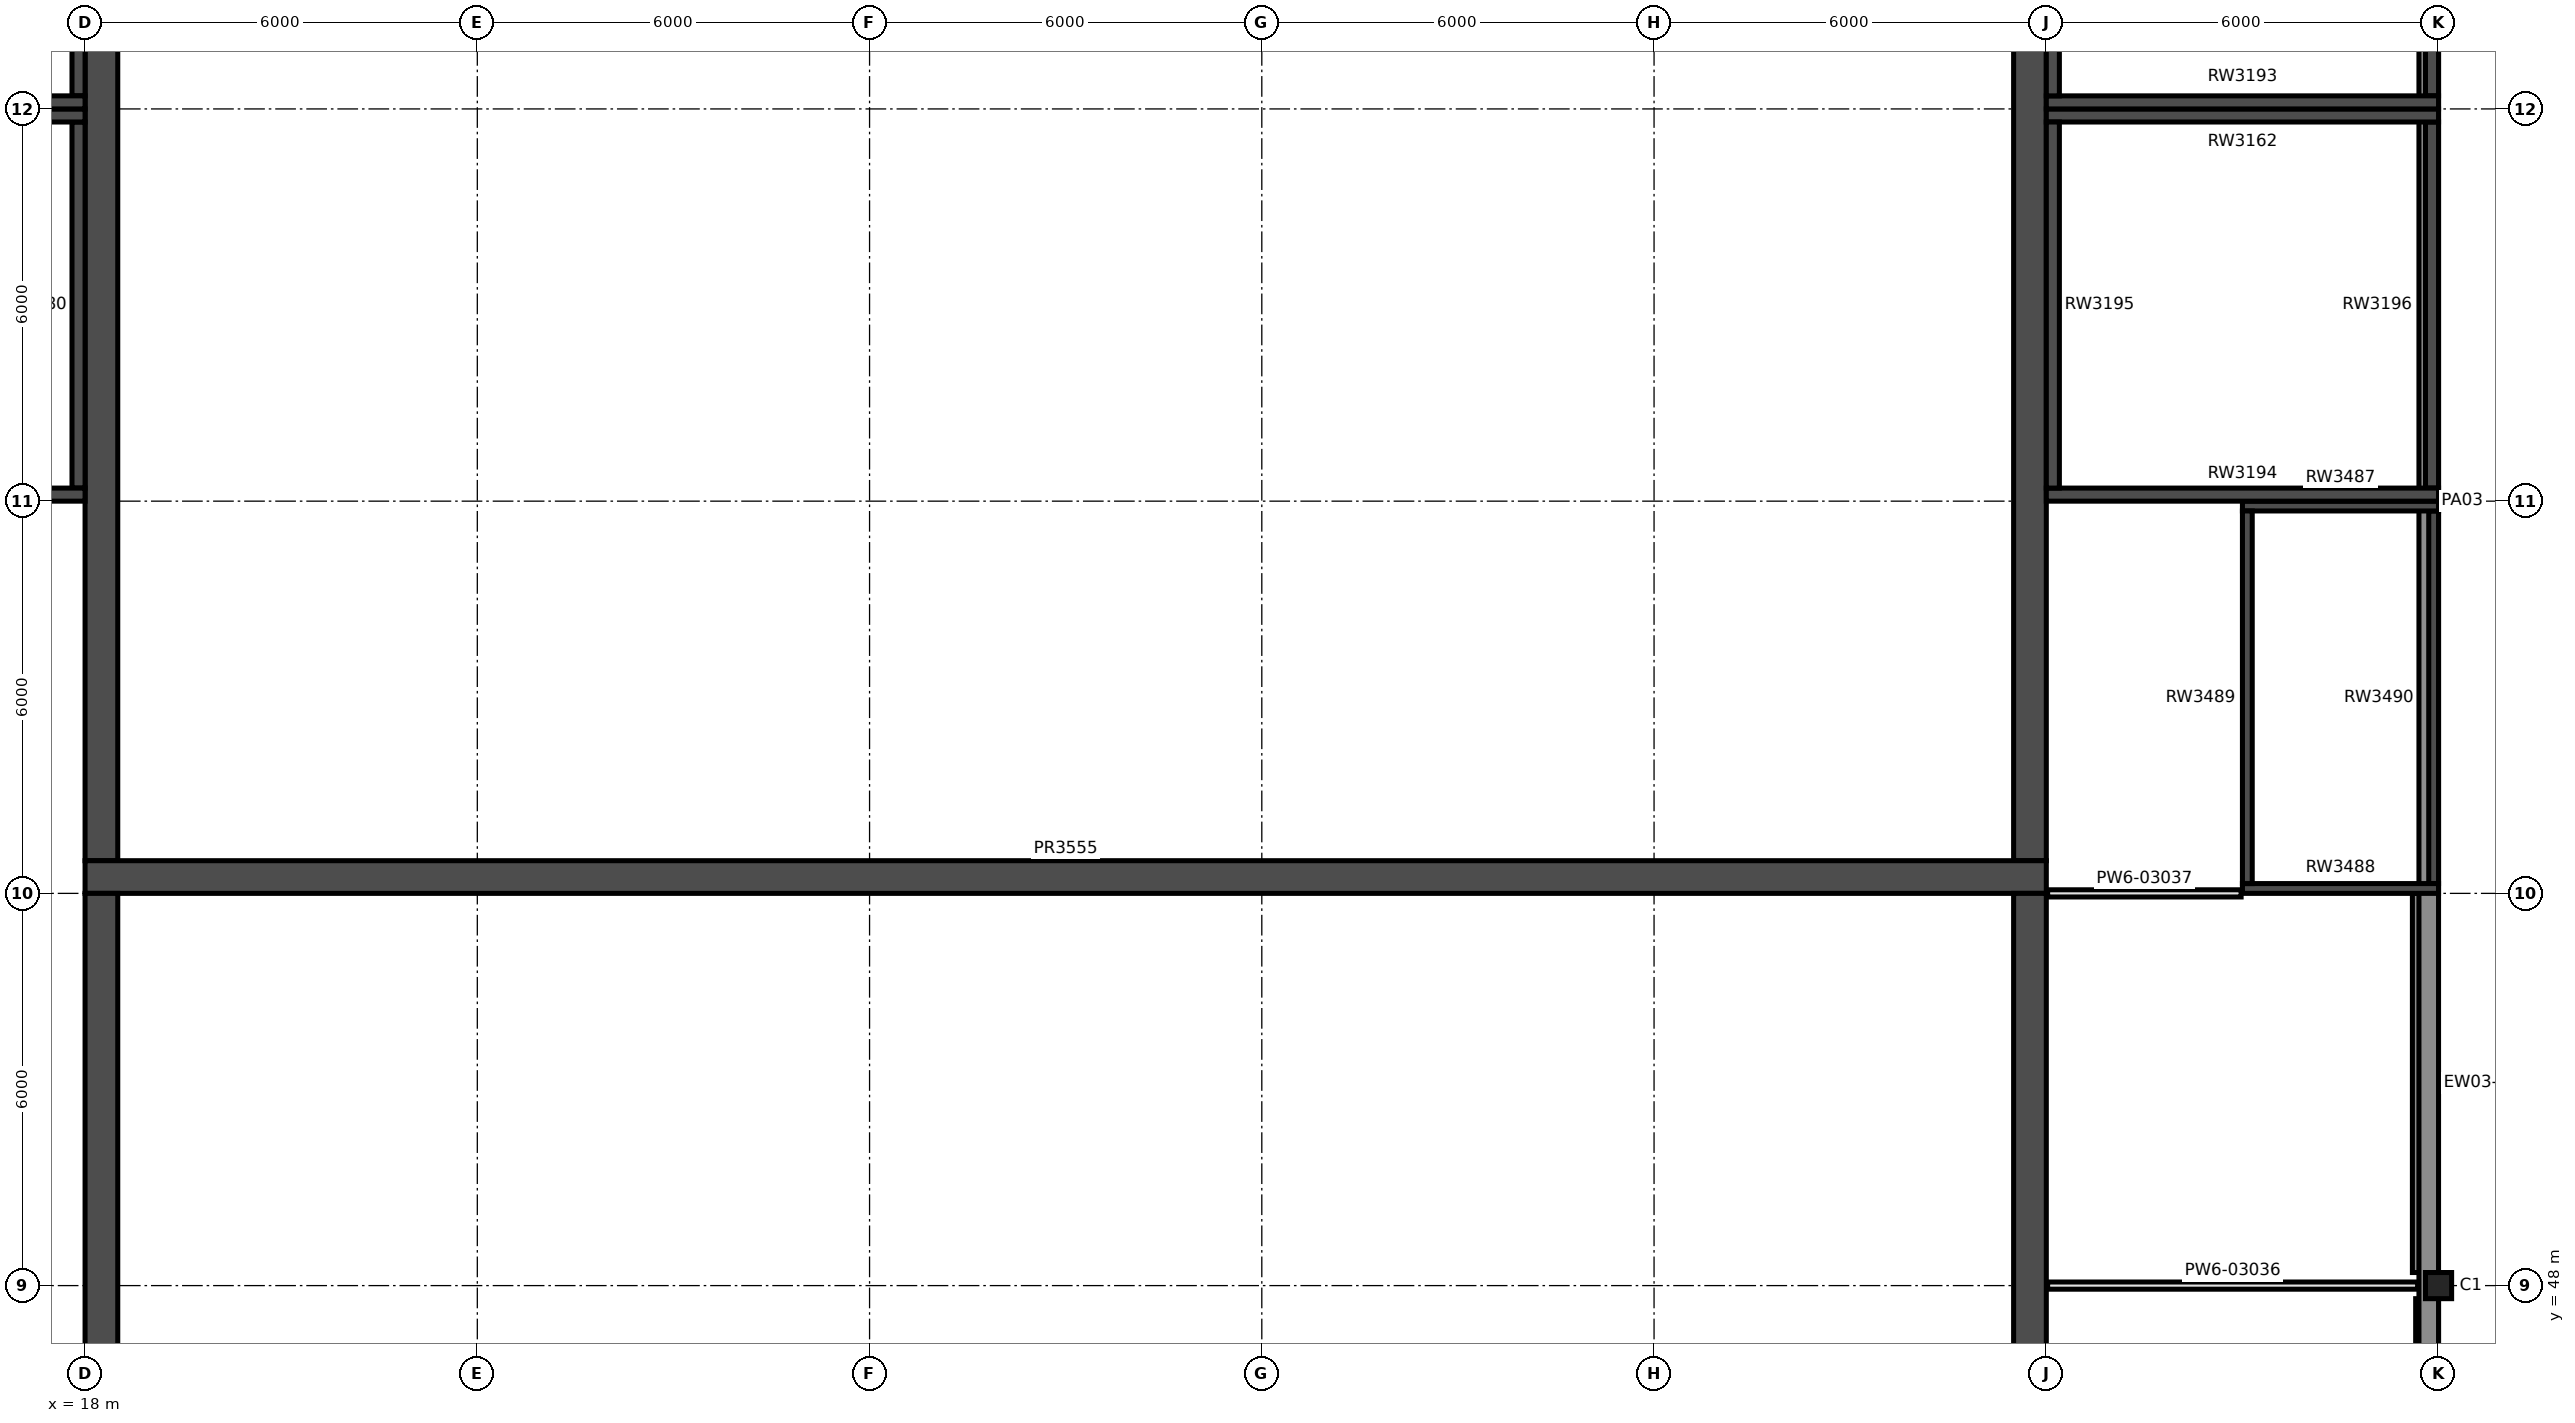
"""IFC4 building model, lengths in metres.
Left out: names, types, materials, properties, quantities, classifications, styles, units other than length and angle.
Written with IfcOpenShell. Run it as: python <this file> out.ifc"""

import sys

from ifc_helpers import new_model, si_unit, direction, frame, frame_2d, origin, origin_2d, place, context, subcontext, project, spatial, rectangle, extrude, element, fill, save


model = new_model("IFC4")
c1 = context("Model", 3, precision=1e-05, world=origin(), true_north=direction((0.0, 1.0)))
c2 = subcontext(c1, "Body", "Model", "MODEL_VIEW")
j1 = project(units=[si_unit("LENGTHUNIT", "METRE"), si_unit("PLANEANGLEUNIT", "RADIAN")], contexts=[c1])
p1 = place(None, origin())
s1 = spatial("IfcSite", under=j1, at=p1, CompositionType="ELEMENT")
p2 = place(p1, origin())
s2 = spatial("IfcBuilding", under=s1, at=p2, CompositionType="ELEMENT")
p3 = place(p2, frame((0.0, 0.0, 16.5)))
s3 = spatial("IfcBuildingStorey", under=s2, at=p3, CompositionType="ELEMENT", Elevation=16.5)
p4 = place(p3, frame((54.0, 48.0, 0.0), z_axis=(0.0, 0.0, 1.0), x_axis=(1.0, 0.0, 0.0)))
e1 = element("IfcColumn", 1, at=p4, inside=s3, PredefinedType="COLUMN", context=c2, shape_type="SweptSolid", body=[
    extrude(rectangle(XDim=0.4, YDim=0.4, at=origin_2d()), origin(), (0.0, 0.0, 1.0), 4.5),
])
p5 = place(p3, frame((12.0, 66.1, 0.0), z_axis=(0.0, 0.0, 1.0), x_axis=(1.0, 0.0, 0.0)))
e2 = element("IfcWall", 2, at=p5, inside=s3, PredefinedType="SHEAR", context=c2, shape_type="SweptSolid", body=[
    extrude(rectangle(XDim=6.0, YDim=0.2, at=frame_2d((3.0, 0.0))), origin(), (0.0, 0.0, 1.0), 4.422),
])
p6 = place(p3, frame((17.9, 66.2, 0.0), z_axis=(0.0, 0.0, 1.0), x_axis=(0.0, 1.0, 0.0)))
e3 = element("IfcWall", 3, at=p6, inside=s3, PredefinedType="SHEAR", context=c2, shape_type="SweptSolid", body=[
    extrude(rectangle(XDim=5.6, YDim=0.2, at=frame_2d((2.8, 0.0))), origin(), (0.0, 0.0, 1.0), 4.422),
])
p7 = place(p3, frame((48.0, 66.1, 0.0), z_axis=(0.0, 0.0, 1.0), x_axis=(1.0, 0.0, 0.0)))
e4 = element("IfcWall", 4, at=p7, inside=s3, PredefinedType="SHEAR", context=c2, shape_type="SweptSolid", body=[
    extrude(rectangle(XDim=6.0, YDim=0.2, at=frame_2d((3.0, 0.0))), origin(), (0.0, 0.0, 1.0), 4.422),
])
p8 = place(p3, frame((48.1, 66.2, 0.0), z_axis=(0.0, 0.0, 1.0), x_axis=(0.0, 1.0, 0.0)))
e5 = element("IfcWall", 5, at=p8, inside=s3, PredefinedType="SHEAR", context=c2, shape_type="SweptSolid", body=[
    extrude(rectangle(XDim=5.6, YDim=0.2, at=frame_2d((2.8, 0.0))), origin(), (0.0, 0.0, 1.0), 4.422),
])
p9 = place(p3, frame((53.9, 66.2, 0.0), z_axis=(0.0, 0.0, 1.0), x_axis=(0.0, 1.0, 0.0)))
e6 = element("IfcWall", 6, at=p9, inside=s3, PredefinedType="SHEAR", context=c2, shape_type="SweptSolid", body=[
    extrude(rectangle(XDim=5.6, YDim=0.2, at=frame_2d((2.8, 0.0))), origin(), (0.0, 0.0, 1.0), 4.5),
])
p10 = place(p3, frame((12.0, 65.9, 0.0), z_axis=(0.0, 0.0, 1.0), x_axis=(1.0, 0.0, 0.0)))
e7 = element("IfcWall", 7, at=p10, inside=s3, PredefinedType="SHEAR", context=c2, shape_type="SweptSolid", body=[
    extrude(rectangle(XDim=6.0, YDim=0.2, at=frame_2d((3.0, 0.0))), origin(), (0.0, 0.0, 1.0), 4.422),
])
p11 = place(p3, frame((12.0, 60.1, 0.0), z_axis=(0.0, 0.0, 1.0), x_axis=(1.0, 0.0, 0.0)))
e8 = element("IfcWall", 8, at=p11, inside=s3, PredefinedType="SHEAR", context=c2, shape_type="SweptSolid", body=[
    extrude(rectangle(XDim=6.0, YDim=0.2, at=frame_2d((3.0, 0.0))), origin(), (0.0, 0.0, 1.0), 4.422),
])
p12 = place(p11, frame((3.375, 0.0, 0.0)))
e9 = element("IfcOpeningElement", 9, at=p12, cuts=e8, PredefinedType="OPENING", context=c2, shape_type="SweptSolid", body=[
    extrude(rectangle(XDim=1.8, YDim=2.2, at=frame_2d((0.9, 1.1))), frame((0.0, 0.11, 0.0), z_axis=(0.0, -1.0, 0.0), x_axis=(1.0, 0.0, 0.0)), (0.0, 0.0, 1.0), 0.22),
])
p13 = place(p3, frame((17.9, 60.2, 0.0), z_axis=(0.0, 0.0, 1.0), x_axis=(0.0, 1.0, 0.0)))
e10 = element("IfcWall", 10, at=p13, inside=s3, PredefinedType="SHEAR", context=c2, shape_type="SweptSolid", body=[
    extrude(rectangle(XDim=5.6, YDim=0.2, at=frame_2d((2.8, 0.0))), origin(), (0.0, 0.0, 1.0), 4.422),
])
p14 = place(p3, frame((48.0, 65.9, 0.0), z_axis=(0.0, 0.0, 1.0), x_axis=(1.0, 0.0, 0.0)))
e11 = element("IfcWall", 11, at=p14, inside=s3, PredefinedType="SHEAR", context=c2, shape_type="SweptSolid", body=[
    extrude(rectangle(XDim=6.0, YDim=0.2, at=frame_2d((3.0, 0.0))), origin(), (0.0, 0.0, 1.0), 4.422),
])
p15 = place(p3, frame((48.0, 60.1, 0.0), z_axis=(0.0, 0.0, 1.0), x_axis=(1.0, 0.0, 0.0)))
e12 = element("IfcWall", 12, at=p15, inside=s3, PredefinedType="SHEAR", context=c2, shape_type="SweptSolid", body=[
    extrude(rectangle(XDim=6.0, YDim=0.2, at=frame_2d((3.0, 0.0))), origin(), (0.0, 0.0, 1.0), 4.422),
])
p16 = place(p15, frame((0.825, 0.0, 0.0)))
e13 = element("IfcOpeningElement", 13, at=p16, cuts=e12, PredefinedType="OPENING", context=c2, shape_type="SweptSolid", body=[
    extrude(rectangle(XDim=1.8, YDim=2.2, at=frame_2d((0.9, 1.1))), frame((0.0, 0.11, 0.0), z_axis=(0.0, -1.0, 0.0), x_axis=(1.0, 0.0, 0.0)), (0.0, 0.0, 1.0), 0.22),
])
p17 = place(p3, frame((48.1, 60.2, 0.0), z_axis=(0.0, 0.0, 1.0), x_axis=(0.0, 1.0, 0.0)))
e14 = element("IfcWall", 14, at=p17, inside=s3, PredefinedType="SHEAR", context=c2, shape_type="SweptSolid", body=[
    extrude(rectangle(XDim=5.6, YDim=0.2, at=frame_2d((2.8, 0.0))), origin(), (0.0, 0.0, 1.0), 4.422),
])
p18 = place(p3, frame((53.9, 60.2, 0.0), z_axis=(0.0, 0.0, 1.0), x_axis=(0.0, 1.0, 0.0)))
e15 = element("IfcWall", 15, at=p18, inside=s3, PredefinedType="SHEAR", context=c2, shape_type="SweptSolid", body=[
    extrude(rectangle(XDim=5.6, YDim=0.2, at=frame_2d((2.8, 0.0))), origin(), (0.0, 0.0, 1.0), 4.5),
])
p19 = place(p18, frame((2.55, 0.0, 0.9)))
e16 = element("IfcOpeningElement", 16, at=p19, cuts=e15, PredefinedType="OPENING", context=c2, shape_type="SweptSolid", body=[
    extrude(rectangle(XDim=0.5, YDim=2.1, at=frame_2d((0.25, 1.05))), frame((0.0, 0.11, 0.0), z_axis=(0.0, -1.0, 0.0), x_axis=(1.0, 0.0, 0.0)), (0.0, 0.0, 1.0), 0.22),
])
for number, where, z_axis, x_axis in (
    (17, (51.0, 59.925, 0.0), (0.0, 0.0, 1.0), (1.0, 0.0, 0.0)),
    (18, (51.0, 54.075, 0.0), (0.0, 0.0, 1.0), (1.0, 0.0, 0.0)),
):
    element("IfcWall", number, at=place(p3, frame(where, z_axis=z_axis, x_axis=x_axis)), inside=s3, PredefinedType="SHEAR", context=c2, shape_type="SweptSolid", body=[
        extrude(rectangle(XDim=3.0, YDim=0.15, at=frame_2d((1.5, 0.0))), origin(), (0.0, 0.0, 1.0), 4.5),
    ])
for number, where, z_axis, x_axis in (
    (19, (51.075, 54.15, 0.0), (0.0, 0.0, 1.0), (0.0, 1.0, 0.0)),
    (20, (53.925, 54.15, 0.0), (0.0, 0.0, 1.0), (0.0, 1.0, 0.0)),
):
    element("IfcWall", number, at=place(p3, frame(where, z_axis=z_axis, x_axis=x_axis)), inside=s3, PredefinedType="SHEAR", context=c2, shape_type="SweptSolid", body=[
        extrude(rectangle(XDim=5.7, YDim=0.15, at=frame_2d((2.85, 0.0))), origin(), (0.0, 0.0, 1.0), 4.5),
    ])
p20 = place(p3, frame((18.25, 54.5, 0.0), z_axis=(0.0, 0.0, 1.0), x_axis=(0.0, 1.0, 0.0)))
e21 = element("IfcWall", 21, at=p20, inside=s3, PredefinedType="SHEAR", context=c2, shape_type="SweptSolid", body=[
    extrude(rectangle(XDim=35.5, YDim=0.5, at=frame_2d((17.75, 0.0))), origin(), (0.0, 0.0, 1.0), 3.9),
])
p21 = place(p20, frame((29.35, 0.0, 0.0)))
e22 = element("IfcOpeningElement", 22, at=p21, cuts=e21, PredefinedType="OPENING", context=c2, shape_type="SweptSolid", body=[
    extrude(rectangle(XDim=1.3, YDim=2.1, at=frame_2d((0.65, 1.05))), frame((0.0, 0.26, 0.0), z_axis=(0.0, -1.0, 0.0), x_axis=(1.0, 0.0, 0.0)), (0.0, 0.0, 1.0), 0.52),
])
p22 = place(p20, frame((2.6, 0.0, 0.0)))
e23 = element("IfcOpeningElement", 23, at=p22, cuts=e21, PredefinedType="OPENING", context=c2, shape_type="SweptSolid", body=[
    extrude(rectangle(XDim=1.0, YDim=2.1, at=frame_2d((0.5, 1.05))), frame((0.0, 0.26, 0.0), z_axis=(0.0, -1.0, 0.0), x_axis=(1.0, 0.0, 0.0)), (0.0, 0.0, 1.0), 0.52),
])
p23 = place(p3, frame((18.25, 30.0, 0.0), z_axis=(0.0, 0.0, 1.0), x_axis=(0.0, 1.0, 0.0)))
e24 = element("IfcWall", 24, at=p23, inside=s3, PredefinedType="SHEAR", context=c2, shape_type="SweptSolid", body=[
    extrude(rectangle(XDim=24.0, YDim=0.5, at=frame_2d((12.0, 0.0))), origin(), (0.0, 0.0, 1.0), 6.5),
])
p24 = place(p3, frame((47.75, 54.5, 0.0), z_axis=(0.0, 0.0, 1.0), x_axis=(0.0, 1.0, 0.0)))
e25 = element("IfcWall", 25, at=p24, inside=s3, PredefinedType="SHEAR", context=c2, shape_type="SweptSolid", body=[
    extrude(rectangle(XDim=35.5, YDim=0.5, at=frame_2d((17.75, 0.0))), origin(), (0.0, 0.0, 1.0), 3.9),
])
p25 = place(p24, frame((29.35, 0.0, 0.0)))
e26 = element("IfcOpeningElement", 26, at=p25, cuts=e25, PredefinedType="OPENING", context=c2, shape_type="SweptSolid", body=[
    extrude(rectangle(XDim=1.3, YDim=2.1, at=frame_2d((0.65, 1.05))), frame((0.0, 0.26, 0.0), z_axis=(0.0, -1.0, 0.0), x_axis=(1.0, 0.0, 0.0)), (0.0, 0.0, 1.0), 0.52),
])
p26 = place(p24, frame((2.6, 0.0, 0.0)))
e27 = element("IfcOpeningElement", 27, at=p26, cuts=e25, PredefinedType="OPENING", context=c2, shape_type="SweptSolid", body=[
    extrude(rectangle(XDim=1.0, YDim=2.1, at=frame_2d((0.5, 1.05))), frame((0.0, 0.26, 0.0), z_axis=(0.0, -1.0, 0.0), x_axis=(1.0, 0.0, 0.0)), (0.0, 0.0, 1.0), 0.52),
])
p27 = place(p3, frame((47.75, 30.0, 0.0), z_axis=(0.0, 0.0, 1.0), x_axis=(0.0, 1.0, 0.0)))
e28 = element("IfcWall", 28, at=p27, inside=s3, PredefinedType="SHEAR", context=c2, shape_type="SweptSolid", body=[
    extrude(rectangle(XDim=24.0, YDim=0.5, at=frame_2d((12.0, 0.0))), origin(), (0.0, 0.0, 1.0), 6.5),
])
p28 = place(p3, frame((18.0, 54.25, 0.0), z_axis=(0.0, 0.0, 1.0), x_axis=(1.0, 0.0, 0.0)))
e29 = element("IfcWall", 29, at=p28, inside=s3, PredefinedType="SHEAR", context=c2, shape_type="SweptSolid", body=[
    extrude(rectangle(XDim=30.0, YDim=0.5, at=frame_2d((15.0, 0.0))), origin(), (0.0, 0.0, 1.0), 6.5),
])
p29 = place(p3, frame((53.775, 54.0, 0.0), z_axis=(0.0, 0.0, 1.0), x_axis=(0.0, -1.0, 0.0)))
e30 = element("IfcWall", 30, at=p29, inside=s3, PredefinedType="SOLIDWALL", context=c2, shape_type="SweptSolid", body=[
    extrude(rectangle(XDim=5.8, YDim=0.35, at=frame_2d((2.9, 0.0))), origin(), (0.0, 0.0, 1.0), 3.9),
])
p30 = place(p3, frame((53.825, 47.8, 0.0), z_axis=(0.0, 0.0, 1.0), x_axis=(0.0, -1.0, 0.0)))
e31 = element("IfcWall", 31, at=p30, inside=s3, PredefinedType="SOLIDWALL", context=c2, shape_type="SweptSolid", body=[
    extrude(rectangle(XDim=5.8, YDim=0.35, at=frame_2d((2.9, 0.0))), origin(), (0.0, 0.0, 1.0), 3.9),
])
p31 = place(p30, frame((1.35, 0.0, 2.4)))
e32 = element("IfcOpeningElement", 32, at=p31, cuts=e31, PredefinedType="OPENING", context=c2, shape_type="SweptSolid", body=[
    extrude(rectangle(XDim=1.1, YDim=1.1, at=frame_2d((0.55, 0.55))), frame((0.0, 0.185, 0.0), z_axis=(0.0, -1.0, 0.0), x_axis=(1.0, 0.0, 0.0)), (0.0, 0.0, 1.0), 0.37),
])
p32 = place(p30, frame((3.35, 0.0, 2.4)))
e33 = element("IfcOpeningElement", 33, at=p32, cuts=e31, PredefinedType="OPENING", context=c2, shape_type="SweptSolid", body=[
    extrude(rectangle(XDim=1.1, YDim=1.1, at=frame_2d((0.55, 0.55))), frame((0.0, 0.185, 0.0), z_axis=(0.0, -1.0, 0.0), x_axis=(1.0, 0.0, 0.0)), (0.0, 0.0, 1.0), 0.37),
])
p33 = place(p3, frame((53.85, 30.0, 4.5), z_axis=(0.0, 0.0, 1.0), x_axis=(0.0, 1.0, 0.0)))
e34 = element("IfcWall", 34, at=p33, inside=s3, PredefinedType="PARAPET", context=c2, shape_type="SweptSolid", body=[
    extrude(rectangle(XDim=60.0, YDim=0.3, at=frame_2d((30.0, 0.0))), origin(), (0.0, 0.0, 1.0), 1.2),
])
p34 = place(p3, frame((48.02, 48.0, 0.0), z_axis=(0.0, 0.0, 1.0), x_axis=(1.0, 0.0, 0.0)))
e35 = element("IfcWall", 35, at=p34, inside=s3, PredefinedType="PARTITIONING", context=c2, shape_type="SweptSolid", body=[
    extrude(rectangle(XDim=5.66, YDim=0.11, at=frame_2d((2.83, 0.0))), origin(), (0.0, 0.0, 1.0), 4.28),
])
p35 = place(p34, frame((2.53, 0.0, 0.0)))
e36 = element("IfcOpeningElement", 36, at=p35, cuts=e35, PredefinedType="OPENING", context=c2, shape_type="SweptSolid", body=[
    extrude(rectangle(XDim=0.92, YDim=2.04, at=frame_2d((0.46, 1.02))), frame((0.0, 0.065, 0.0), z_axis=(0.0, -1.0, 0.0), x_axis=(1.0, 0.0, 0.0)), (0.0, 0.0, 1.0), 0.13),
])
p36 = place(p3, frame((48.02, 54.0, 0.0), z_axis=(0.0, 0.0, 1.0), x_axis=(1.0, 0.0, 0.0)))
e37 = element("IfcWall", 37, at=p36, inside=s3, PredefinedType="PARTITIONING", context=c2, shape_type="SweptSolid", body=[
    extrude(rectangle(XDim=2.96, YDim=0.11, at=frame_2d((1.48, 0.0))), origin(), (0.0, 0.0, 1.0), 3.9),
])
p37 = place(p19, origin())
e38 = element("IfcWindow", 38, at=p37, inside=s3, PartitioningType="SINGLE_PANEL", PredefinedType="WINDOW", context=c2, shape_type="SweptSolid", body=[
    extrude(rectangle(XDim=0.5, YDim=2.1, at=frame_2d((0.25, 1.05))), frame((0.0, 0.03, 0.0), z_axis=(0.0, -1.0, 0.0), x_axis=(1.0, 0.0, 0.0)), (0.0, 0.0, 1.0), 0.06),
])
fill(e16, e38)
p38 = place(p35, origin())
e39 = element("IfcDoor", 39, at=p38, inside=s3, OperationType="SINGLE_SWING_LEFT", PredefinedType="DOOR", context=c2, shape_type="SweptSolid", body=[
    extrude(rectangle(XDim=0.92, YDim=2.04, at=frame_2d((0.46, 1.02))), frame((0.0, 0.025, 0.0), z_axis=(0.0, -1.0, 0.0), x_axis=(1.0, 0.0, 0.0)), (0.0, 0.0, 1.0), 0.05),
])
fill(e36, e39)
p39 = place(p16, origin())
e40 = element("IfcDoor", 40, at=p39, inside=s3, OperationType="DOUBLE_DOOR_SINGLE_SWING", PredefinedType="DOOR", context=c2, shape_type="SweptSolid", body=[
    extrude(rectangle(XDim=1.8, YDim=2.2, at=frame_2d((0.9, 1.1))), frame((0.0, 0.025, 0.0), z_axis=(0.0, -1.0, 0.0), x_axis=(1.0, 0.0, 0.0)), (0.0, 0.0, 1.0), 0.05),
])
fill(e13, e40)
p40 = place(p22, origin())
e41 = element("IfcDoor", 41, at=p40, inside=s3, OperationType="SINGLE_SWING_LEFT", PredefinedType="DOOR", context=c2, shape_type="SweptSolid", body=[
    extrude(rectangle(XDim=1.0, YDim=2.1, at=frame_2d((0.5, 1.05))), frame((0.0, 0.025, 0.0), z_axis=(0.0, -1.0, 0.0), x_axis=(1.0, 0.0, 0.0)), (0.0, 0.0, 1.0), 0.05),
])
fill(e23, e41)
p41 = place(p26, frame((1.0, 0.0, 0.0), z_axis=(0.0, 0.0, 1.0), x_axis=(-1.0, 0.0, 0.0)))
e42 = element("IfcDoor", 42, at=p41, inside=s3, OperationType="SINGLE_SWING_RIGHT", PredefinedType="DOOR", context=c2, shape_type="SweptSolid", body=[
    extrude(rectangle(XDim=1.0, YDim=2.1, at=frame_2d((0.5, 1.05))), frame((0.0, 0.025, 0.0), z_axis=(0.0, -1.0, 0.0), x_axis=(1.0, 0.0, 0.0)), (0.0, 0.0, 1.0), 0.05),
])
fill(e27, e42)
save(model, sys.argv[1])
